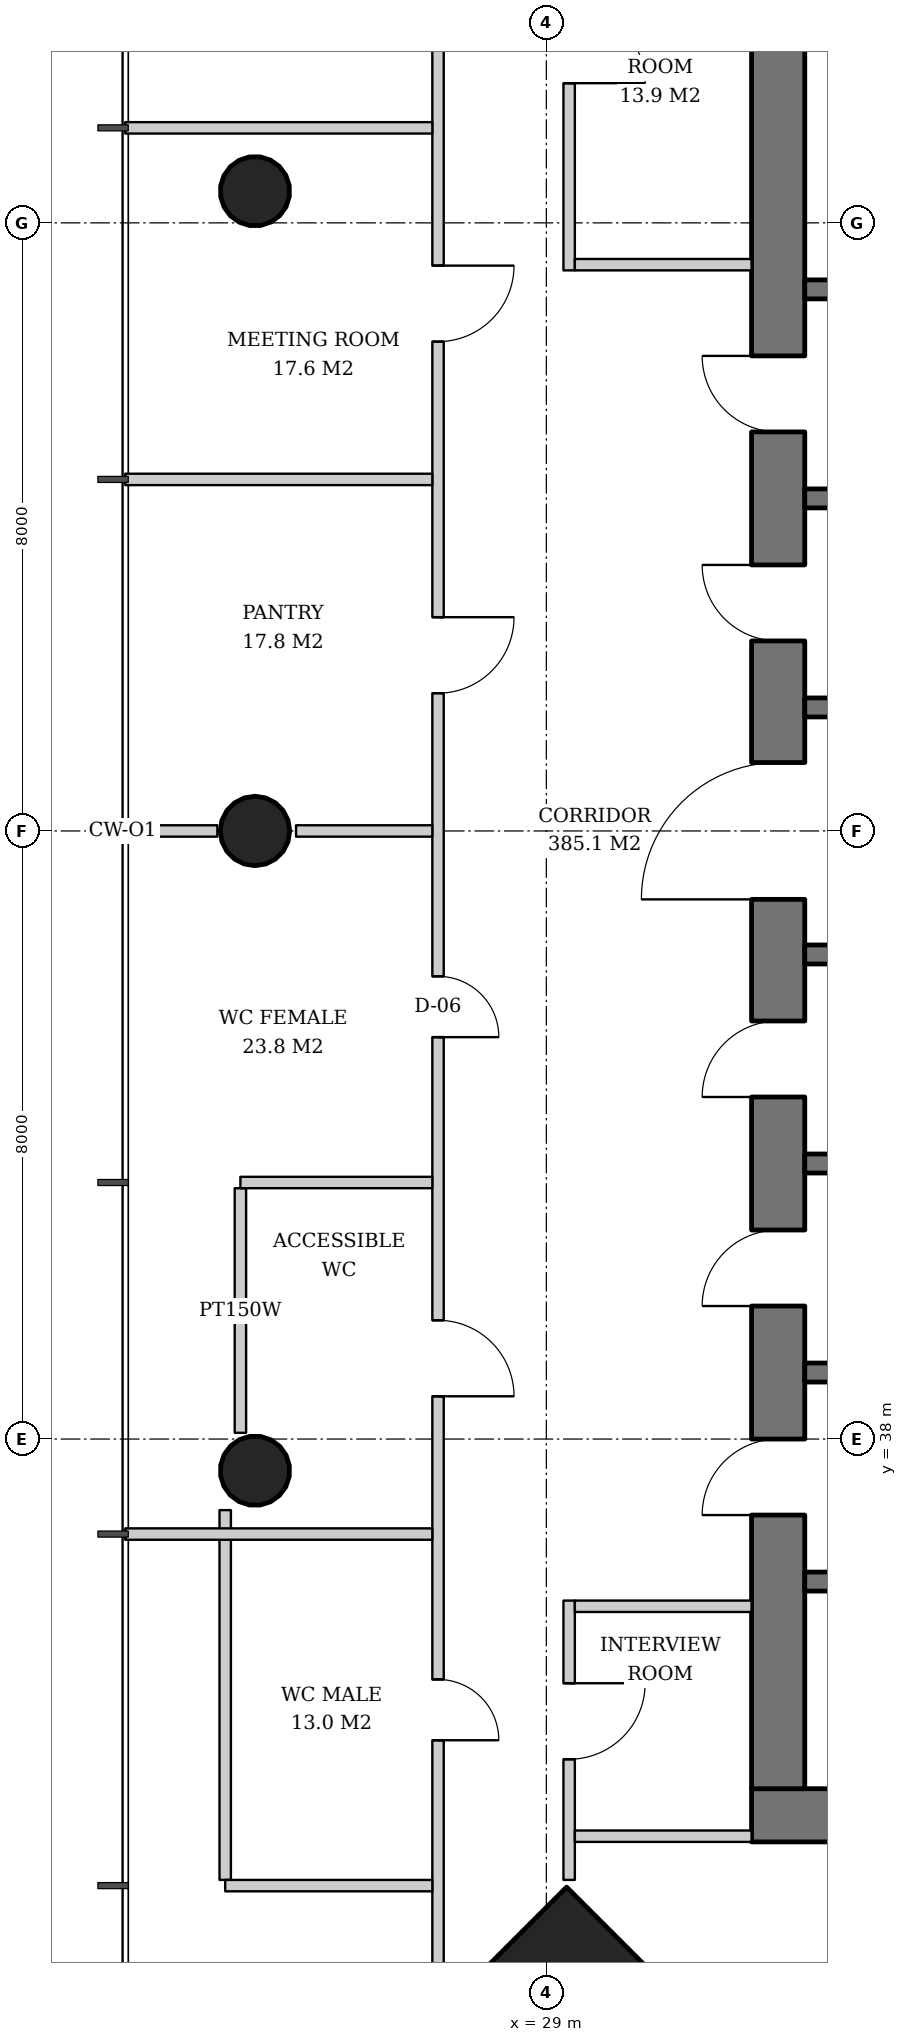
"""IFC4 building model, lengths in metres.
Left out: names, types, materials, properties, quantities, classifications, styles, units other than length and angle.
Written with IfcOpenShell. Run it as: python <this file> out.ifc"""

import sys

from ifc_helpers import new_model, si_unit, direction, frame, frame_2d, origin, origin_2d, place, context, subcontext, project, spatial, rectangle, hollow_circle, extrude, element, fill, save


model = new_model("IFC4")
c1 = context("Model", 3, precision=1e-05, world=origin(), true_north=direction((0.0, 1.0)))
c2 = subcontext(c1, "Body", "Model", "MODEL_VIEW")
j1 = project(units=[si_unit("LENGTHUNIT", "METRE"), si_unit("PLANEANGLEUNIT", "RADIAN")], contexts=[c1])
p1 = place(None, origin())
s1 = spatial("IfcSite", under=j1, at=p1, CompositionType="ELEMENT")
p2 = place(p1, origin())
s2 = spatial("IfcBuilding", under=s1, at=p2, CompositionType="ELEMENT")
p3 = place(p2, frame((0.0, 0.0, 150.2)))
s3 = spatial("IfcBuildingStorey", under=s2, at=p3, CompositionType="ELEMENT", Elevation=150.2)
p4 = place(p3, frame((29.229, 30.229, 0.0), z_axis=(0.031962158256, 0.031962158256, 0.998977898093), x_axis=(-0.707106781187, 0.707106781187, 0.0)))
e1 = element("IfcColumn", 1, at=p4, inside=s3, PredefinedType="COLUMN", context=c2, shape_type="SweptSolid", body=[
    extrude(rectangle(XDim=2.6, YDim=2.6, at=origin_2d()), origin(), (0.0, 0.0, 1.0), 3.804),
])
p5 = place(p3, frame((25.129, 54.436, 0.0), z_axis=(0.031910269556, -0.015987237665, 0.999362868496), x_axis=(0.447933021895, 0.894067115991, 0.0)))
e2 = element("IfcColumn", 2, at=p5, inside=s3, PredefinedType="COLUMN", context=c2, shape_type="SweptSolid", body=[
    extrude(hollow_circle(Radius=0.457, WallThickness=0.03, at=origin_2d()), origin(), (0.0, 0.0, 1.0), 3.802),
])
p6 = place(p3, frame((25.129, 46.0, 0.0), z_axis=(0.031914348339, 0.0, 0.999490607445), x_axis=(0.0, 1.0, 0.0)))
e3 = element("IfcColumn", 3, at=p6, inside=s3, PredefinedType="COLUMN", context=c2, shape_type="SweptSolid", body=[
    extrude(hollow_circle(Radius=0.457, WallThickness=0.03, at=origin_2d()), origin(), (0.0, 0.0, 1.0), 3.802),
])
p7 = place(p3, frame((25.129, 37.564, 0.0), z_axis=(0.031910269556, 0.015987237665, 0.999362868496), x_axis=(-0.447933021895, 0.894067115991, 0.0)))
e4 = element("IfcColumn", 4, at=p7, inside=s3, PredefinedType="COLUMN", context=c2, shape_type="SweptSolid", body=[
    extrude(hollow_circle(Radius=0.457, WallThickness=0.03, at=origin_2d()), origin(), (0.0, 0.0, 1.0), 3.802),
])
p8 = place(p3, frame((31.7, 33.05, 0.0), z_axis=(0.0, 0.0, 1.0), x_axis=(1.0, 0.0, 0.0)))
e5 = element("IfcWall", 5, at=p8, inside=s3, PredefinedType="SHEAR", context=c2, shape_type="SweptSolid", body=[
    extrude(rectangle(XDim=26.6, YDim=0.7, at=frame_2d((13.3, 0.0))), origin(), (0.0, 0.0, 1.0), 3.8),
])
p9 = place(p8, frame((7.3, 0.0, 0.0)))
e6 = element("IfcOpeningElement", 6, at=p9, cuts=e5, PredefinedType="OPENING", context=c2, shape_type="SweptSolid", body=[
    extrude(rectangle(XDim=1.0, YDim=2.1, at=frame_2d((0.5, 1.05))), frame((0.0, 0.36, 0.0), z_axis=(0.0, -1.0, 0.0), x_axis=(1.0, 0.0, 0.0)), (0.0, 0.0, 1.0), 0.72),
])
p10 = place(p8, frame((18.75, 0.0, 0.0)))
e7 = element("IfcOpeningElement", 7, at=p10, cuts=e5, PredefinedType="OPENING", context=c2, shape_type="SweptSolid", body=[
    extrude(rectangle(XDim=1.0, YDim=2.1, at=frame_2d((0.5, 1.05))), frame((0.0, 0.36, 0.0), z_axis=(0.0, -1.0, 0.0), x_axis=(1.0, 0.0, 0.0)), (0.0, 0.0, 1.0), 0.72),
])
p11 = place(p8, frame((1.85, 0.0, 0.0)))
e8 = element("IfcOpeningElement", 8, at=p11, cuts=e5, PredefinedType="OPENING", context=c2, shape_type="SweptSolid", body=[
    extrude(rectangle(XDim=1.0, YDim=2.1, at=frame_2d((0.5, 1.05))), frame((0.0, 0.36, 0.0), z_axis=(0.0, -1.0, 0.0), x_axis=(1.0, 0.0, 0.0)), (0.0, 0.0, 1.0), 0.72),
])
p12 = place(p8, frame((4.7, 0.0, 0.0)))
e9 = element("IfcOpeningElement", 9, at=p12, cuts=e5, PredefinedType="OPENING", context=c2, shape_type="SweptSolid", body=[
    extrude(rectangle(XDim=1.0, YDim=2.1, at=frame_2d((0.5, 1.05))), frame((0.0, 0.36, 0.0), z_axis=(0.0, -1.0, 0.0), x_axis=(1.0, 0.0, 0.0)), (0.0, 0.0, 1.0), 0.72),
])
p13 = place(p8, frame((12.44, 0.0, 0.0)))
e10 = element("IfcOpeningElement", 10, at=p13, cuts=e5, PredefinedType="OPENING", context=c2, shape_type="SweptSolid", body=[
    extrude(rectangle(XDim=1.0, YDim=2.1, at=frame_2d((0.5, 1.05))), frame((0.0, 0.36, 0.0), z_axis=(0.0, -1.0, 0.0), x_axis=(1.0, 0.0, 0.0)), (0.0, 0.0, 1.0), 0.72),
])
p14 = place(p8, frame((20.644, 0.0, 0.0)))
e11 = element("IfcOpeningElement", 11, at=p14, cuts=e5, PredefinedType="OPENING", context=c2, shape_type="SweptSolid", body=[
    extrude(rectangle(XDim=1.0, YDim=2.1, at=frame_2d((0.5, 1.05))), frame((0.0, 0.36, 0.0), z_axis=(0.0, -1.0, 0.0), x_axis=(1.0, 0.0, 0.0)), (0.0, 0.0, 1.0), 0.72),
])
p15 = place(p8, frame((23.544, 0.0, 0.0)))
e12 = element("IfcOpeningElement", 12, at=p15, cuts=e5, PredefinedType="OPENING", context=c2, shape_type="SweptSolid", body=[
    extrude(rectangle(XDim=1.0, YDim=2.1, at=frame_2d((0.5, 1.05))), frame((0.0, 0.36, 0.0), z_axis=(0.0, -1.0, 0.0), x_axis=(1.0, 0.0, 0.0)), (0.0, 0.0, 1.0), 0.72),
])
p16 = place(p3, frame((32.05, 33.4, 0.0), z_axis=(0.0, 0.0, 1.0), x_axis=(0.0, 1.0, 0.0)))
e13 = element("IfcWall", 13, at=p16, inside=s3, PredefinedType="SHEAR", context=c2, shape_type="SweptSolid", body=[
    extrude(rectangle(XDim=25.2, YDim=0.7, at=frame_2d((12.6, 0.0))), origin(), (0.0, 0.0, 1.0), 3.8),
])
p17 = place(p16, frame((11.7, 0.0, 0.0)))
e14 = element("IfcOpeningElement", 14, at=p17, cuts=e13, PredefinedType="OPENING", context=c2, shape_type="SweptSolid", body=[
    extrude(rectangle(XDim=1.8, YDim=2.4, at=frame_2d((0.9, 1.2))), frame((0.0, 0.36, 0.0), z_axis=(0.0, -1.0, 0.0), x_axis=(1.0, 0.0, 0.0)), (0.0, 0.0, 1.0), 0.72),
])
p18 = place(p16, frame((3.6, 0.0, 0.0)))
e15 = element("IfcOpeningElement", 15, at=p18, cuts=e13, PredefinedType="OPENING", context=c2, shape_type="SweptSolid", body=[
    extrude(rectangle(XDim=1.0, YDim=2.1, at=frame_2d((0.5, 1.05))), frame((0.0, 0.36, 0.0), z_axis=(0.0, -1.0, 0.0), x_axis=(1.0, 0.0, 0.0)), (0.0, 0.0, 1.0), 0.72),
])
p19 = place(p16, frame((6.35, 0.0, 0.0)))
e16 = element("IfcOpeningElement", 16, at=p19, cuts=e13, PredefinedType="OPENING", context=c2, shape_type="SweptSolid", body=[
    extrude(rectangle(XDim=1.0, YDim=2.1, at=frame_2d((0.5, 1.05))), frame((0.0, 0.36, 0.0), z_axis=(0.0, -1.0, 0.0), x_axis=(1.0, 0.0, 0.0)), (0.0, 0.0, 1.0), 0.72),
])
p20 = place(p16, frame((9.1, 0.0, 0.0)))
e17 = element("IfcOpeningElement", 17, at=p20, cuts=e13, PredefinedType="OPENING", context=c2, shape_type="SweptSolid", body=[
    extrude(rectangle(XDim=1.0, YDim=2.1, at=frame_2d((0.5, 1.05))), frame((0.0, 0.36, 0.0), z_axis=(0.0, -1.0, 0.0), x_axis=(1.0, 0.0, 0.0)), (0.0, 0.0, 1.0), 0.72),
])
p21 = place(p16, frame((15.1, 0.0, 0.0)))
e18 = element("IfcOpeningElement", 18, at=p21, cuts=e13, PredefinedType="OPENING", context=c2, shape_type="SweptSolid", body=[
    extrude(rectangle(XDim=1.0, YDim=2.1, at=frame_2d((0.5, 1.05))), frame((0.0, 0.36, 0.0), z_axis=(0.0, -1.0, 0.0), x_axis=(1.0, 0.0, 0.0)), (0.0, 0.0, 1.0), 0.72),
])
p22 = place(p16, frame((17.85, 0.0, 0.0)))
e19 = element("IfcOpeningElement", 19, at=p22, cuts=e13, PredefinedType="OPENING", context=c2, shape_type="SweptSolid", body=[
    extrude(rectangle(XDim=1.0, YDim=2.1, at=frame_2d((0.5, 1.05))), frame((0.0, 0.36, 0.0), z_axis=(0.0, -1.0, 0.0), x_axis=(1.0, 0.0, 0.0)), (0.0, 0.0, 1.0), 0.72),
])
for number, where, z_axis, x_axis in (
    (20, (32.4, 36.125, 0.0), (0.0, 0.0, 1.0), (1.0, 0.0, 0.0)),
    (21, (32.4, 38.875, 0.0), (0.0, 0.0, 1.0), (1.0, 0.0, 0.0)),
    (22, (32.4, 41.625, 0.0), (0.0, 0.0, 1.0), (1.0, 0.0, 0.0)),
    (23, (32.4, 44.375, 0.0), (0.0, 0.0, 1.0), (1.0, 0.0, 0.0)),
    (24, (32.4, 47.625, 0.0), (0.0, 0.0, 1.0), (1.0, 0.0, 0.0)),
    (25, (32.4, 50.375, 0.0), (0.0, 0.0, 1.0), (1.0, 0.0, 0.0)),
    (26, (32.4, 53.125, 0.0), (0.0, 0.0, 1.0), (1.0, 0.0, 0.0)),
):
    element("IfcWall", number, at=place(p3, frame(where, z_axis=z_axis, x_axis=x_axis)), inside=s3, PredefinedType="SHEAR", context=c2, shape_type="SweptSolid", body=[
        extrude(rectangle(XDim=2.7, YDim=0.25, at=frame_2d((1.35, 0.0))), origin(), (0.0, 0.0, 1.0), 3.8),
    ])
p23 = place(p3, frame((29.3, 59.8, 0.0), z_axis=(0.0, 0.0, 1.0), x_axis=(0.0, -1.0, 0.0)))
e27 = element("IfcWall", 27, at=p23, inside=s3, PredefinedType="PARTITIONING", context=c2, shape_type="SweptSolid", body=[
    extrude(rectangle(XDim=6.425, YDim=0.15, at=frame_2d((3.212, 0.0))), origin(), (0.0, 0.0, 1.0), 2.72),
])
p24 = place(p23, frame((2.962, 0.0, 0.0)))
e28 = element("IfcOpeningElement", 28, at=p24, cuts=e27, PredefinedType="OPENING", context=c2, shape_type="SweptSolid", body=[
    extrude(rectangle(XDim=1.0, YDim=2.1, at=frame_2d((0.5, 1.05))), frame((0.0, 0.085, 0.0), z_axis=(0.0, -1.0, 0.0), x_axis=(1.0, 0.0, 0.0)), (0.0, 0.0, 1.0), 0.17),
])
p25 = place(p3, frame((31.7, 53.45, 0.0), z_axis=(0.0, 0.0, 1.0), x_axis=(-1.0, 0.0, 0.0)))
e29 = element("IfcWall", 29, at=p25, inside=s3, PredefinedType="PARTITIONING", context=c2, shape_type="SweptSolid", body=[
    extrude(rectangle(XDim=2.325, YDim=0.15, at=frame_2d((1.163, 0.0))), origin(), (0.0, 0.0, 1.0), 3.62),
])
p26 = place(p3, frame((29.3, 35.875, 0.0), z_axis=(0.0, 0.0, 1.0), x_axis=(0.0, -1.0, 0.0)))
e30 = element("IfcWall", 30, at=p26, inside=s3, PredefinedType="PARTITIONING", context=c2, shape_type="SweptSolid", body=[
    extrude(rectangle(XDim=3.675, YDim=0.15, at=frame_2d((1.837, 0.0))), origin(), (0.0, 0.0, 1.0), 2.806),
])
p27 = place(p26, frame((1.087, 0.0, 0.0)))
e31 = element("IfcOpeningElement", 31, at=p27, cuts=e30, PredefinedType="OPENING", context=c2, shape_type="SweptSolid", body=[
    extrude(rectangle(XDim=1.0, YDim=2.1, at=frame_2d((0.5, 1.05))), frame((0.0, 0.085, 0.0), z_axis=(0.0, -1.0, 0.0), x_axis=(1.0, 0.0, 0.0)), (0.0, 0.0, 1.0), 0.17),
])
for number, where, z_axis, x_axis in (
    (32, (31.7, 35.8, 0.0), (0.0, 0.0, 1.0), (-1.0, 0.0, 0.0)),
    (33, (31.7, 32.775, 0.0), (0.0, 0.0, 1.0), (-1.0, 0.0, 0.0)),
):
    element("IfcWall", number, at=place(p3, frame(where, z_axis=z_axis, x_axis=x_axis)), inside=s3, PredefinedType="PARTITIONING", context=c2, shape_type="SweptSolid", body=[
        extrude(rectangle(XDim=2.325, YDim=0.15, at=frame_2d((1.163, 0.0))), origin(), (0.0, 0.0, 1.0), 3.62),
    ])
p28 = place(p3, frame((24.975, 41.3, 0.0), z_axis=(0.0, 0.0, 1.0), x_axis=(0.0, -1.0, 0.0)))
e34 = element("IfcWall", 34, at=p28, inside=s3, PredefinedType="PARTITIONING", context=c2, shape_type="SweptSolid", body=[
    extrude(rectangle(XDim=3.218, YDim=0.15, at=frame_2d((1.609, 0.0))), origin(), (0.0, 0.0, 1.0), 3.62),
])
p29 = place(p3, frame((24.775, 37.065, 0.0), z_axis=(0.0, 0.0, 1.0), x_axis=(0.0, -1.0, 0.0)))
e35 = element("IfcWall", 35, at=p29, inside=s3, PredefinedType="PARTITIONING", context=c2, shape_type="SweptSolid", body=[
    extrude(rectangle(XDim=4.865, YDim=0.15, at=frame_2d((2.433, 0.0))), origin(), (0.0, 0.0, 1.0), 3.62),
])
p30 = place(p3, frame((27.575, 61.511, 0.0), z_axis=(0.0, 0.0, 1.0), x_axis=(0.0, -1.0, 0.0)))
e36 = element("IfcWall", 36, at=p30, inside=s3, PredefinedType="PARTITIONING", context=c2, shape_type="SweptSolid", body=[
    extrude(rectangle(XDim=31.023, YDim=0.15, at=frame_2d((15.511, 0.0))), origin(), (0.0, 0.0, 1.0), 2.72),
])
p31 = place(p30, frame((3.449, 0.0, 0.0)))
e37 = element("IfcOpeningElement", 37, at=p31, cuts=e36, PredefinedType="OPENING", context=c2, shape_type="SweptSolid", body=[
    extrude(rectangle(XDim=1.0, YDim=2.1, at=frame_2d((0.5, 1.05))), frame((0.0, 0.085, 0.0), z_axis=(0.0, -1.0, 0.0), x_axis=(1.0, 0.0, 0.0)), (0.0, 0.0, 1.0), 0.17),
])
p32 = place(p30, frame((8.074, 0.0, 0.0)))
e38 = element("IfcOpeningElement", 38, at=p32, cuts=e36, PredefinedType="OPENING", context=c2, shape_type="SweptSolid", body=[
    extrude(rectangle(XDim=1.0, YDim=2.1, at=frame_2d((0.5, 1.05))), frame((0.0, 0.085, 0.0), z_axis=(0.0, -1.0, 0.0), x_axis=(1.0, 0.0, 0.0)), (0.0, 0.0, 1.0), 0.17),
])
p33 = place(p30, frame((12.699, 0.0, 0.0)))
e39 = element("IfcOpeningElement", 39, at=p33, cuts=e36, PredefinedType="OPENING", context=c2, shape_type="SweptSolid", body=[
    extrude(rectangle(XDim=1.0, YDim=2.1, at=frame_2d((0.5, 1.05))), frame((0.0, 0.085, 0.0), z_axis=(0.0, -1.0, 0.0), x_axis=(1.0, 0.0, 0.0)), (0.0, 0.0, 1.0), 0.17),
])
p34 = place(p30, frame((17.424, 0.0, 0.0)))
e40 = element("IfcOpeningElement", 40, at=p34, cuts=e36, PredefinedType="OPENING", context=c2, shape_type="SweptSolid", body=[
    extrude(rectangle(XDim=0.8, YDim=2.1, at=frame_2d((0.4, 1.05))), frame((0.0, 0.085, 0.0), z_axis=(0.0, -1.0, 0.0), x_axis=(1.0, 0.0, 0.0)), (0.0, 0.0, 1.0), 0.17),
])
p35 = place(p30, frame((21.949, 0.0, 0.0)))
e41 = element("IfcOpeningElement", 41, at=p35, cuts=e36, PredefinedType="OPENING", context=c2, shape_type="SweptSolid", body=[
    extrude(rectangle(XDim=1.0, YDim=2.1, at=frame_2d((0.5, 1.05))), frame((0.0, 0.085, 0.0), z_axis=(0.0, -1.0, 0.0), x_axis=(1.0, 0.0, 0.0)), (0.0, 0.0, 1.0), 0.17),
])
p36 = place(p30, frame((26.674, 0.0, 0.0)))
e42 = element("IfcOpeningElement", 42, at=p36, cuts=e36, PredefinedType="OPENING", context=c2, shape_type="SweptSolid", body=[
    extrude(rectangle(XDim=0.8, YDim=2.1, at=frame_2d((0.4, 1.05))), frame((0.0, 0.085, 0.0), z_axis=(0.0, -1.0, 0.0), x_axis=(1.0, 0.0, 0.0)), (0.0, 0.0, 1.0), 0.17),
])
for number, where, z_axis, x_axis in (
    (43, (27.5, 55.25, 0.0), (0.0, 0.0, 1.0), (-1.0, 0.0, 0.0)),
    (44, (27.5, 50.625, 0.0), (0.0, 0.0, 1.0), (-1.0, 0.0, 0.0)),
):
    element("IfcWall", number, at=place(p3, frame(where, z_axis=z_axis, x_axis=x_axis)), inside=s3, PredefinedType="PARTITIONING", context=c2, shape_type="SweptSolid", body=[
        extrude(rectangle(XDim=4.04, YDim=0.15, at=frame_2d((2.02, 0.0))), origin(), (0.0, 0.0, 1.0), 2.82),
    ])
p37 = place(p3, frame((27.5, 46.0, 0.0), z_axis=(0.0, 0.0, 1.0), x_axis=(-1.0, 0.0, 0.0)))
e45 = element("IfcWall", 45, at=p37, inside=s3, PredefinedType="PARTITIONING", context=c2, shape_type="SweptSolid", body=[
    extrude(rectangle(XDim=1.793, YDim=0.15, at=frame_2d((0.896, 0.0))), origin(), (0.0, 0.0, 1.0), 3.62),
])
p38 = place(p3, frame((24.672, 46.0, 0.0), z_axis=(0.0, 0.0, 1.0), x_axis=(-1.0, 0.0, 0.0)))
e46 = element("IfcWall", 46, at=p38, inside=s3, PredefinedType="PARTITIONING", context=c2, shape_type="SweptSolid", body=[
    extrude(rectangle(XDim=1.212, YDim=0.15, at=frame_2d((0.606, 0.0))), origin(), (0.0, 0.0, 1.0), 3.62),
])
p39 = place(p3, frame((27.5, 41.375, 0.0), z_axis=(0.0, 0.0, 1.0), x_axis=(-1.0, 0.0, 0.0)))
e47 = element("IfcWall", 47, at=p39, inside=s3, PredefinedType="PARTITIONING", context=c2, shape_type="SweptSolid", body=[
    extrude(rectangle(XDim=2.525, YDim=0.15, at=frame_2d((1.262, 0.0))), origin(), (0.0, 0.0, 1.0), 2.82),
])
p40 = place(p3, frame((27.5, 36.75, 0.0), z_axis=(0.0, 0.0, 1.0), x_axis=(-1.0, 0.0, 0.0)))
e48 = element("IfcWall", 48, at=p40, inside=s3, PredefinedType="PARTITIONING", context=c2, shape_type="SweptSolid", body=[
    extrude(rectangle(XDim=4.04, YDim=0.15, at=frame_2d((2.02, 0.0))), origin(), (0.0, 0.0, 1.0), 2.82),
])
p41 = place(p3, frame((27.5, 32.125, 0.0), z_axis=(0.0, 0.0, 1.0), x_axis=(-1.0, 0.0, 0.0)))
e49 = element("IfcWall", 49, at=p41, inside=s3, PredefinedType="PARTITIONING", context=c2, shape_type="SweptSolid", body=[
    extrude(rectangle(XDim=2.725, YDim=0.15, at=frame_2d((1.363, 0.0))), origin(), (0.0, 0.0, 1.0), 2.82),
])
p42 = place(p17, origin())
e50 = element("IfcDoor", 50, at=p42, inside=s3, OperationType="DOUBLE_DOOR_SINGLE_SWING", PredefinedType="DOOR", context=c2, shape_type="SweptSolid", body=[
    extrude(rectangle(XDim=1.8, YDim=2.4, at=frame_2d((0.9, 1.2))), frame((0.0, 0.025, 0.0), z_axis=(0.0, -1.0, 0.0), x_axis=(1.0, 0.0, 0.0)), (0.0, 0.0, 1.0), 0.05),
])
fill(e14, e50)
p43 = place(p18, origin())
e51 = element("IfcDoor", 51, at=p43, inside=s3, OperationType="SINGLE_SWING_LEFT", PredefinedType="DOOR", context=c2, shape_type="SweptSolid", body=[
    extrude(rectangle(XDim=1.0, YDim=2.1, at=frame_2d((0.5, 1.05))), frame((0.0, -0.29, 0.0), z_axis=(0.0, -1.0, 0.0), x_axis=(1.0, 0.0, 0.0)), (0.0, 0.0, 1.0), 0.05),
])
fill(e15, e51)
p44 = place(p19, origin())
e52 = element("IfcDoor", 52, at=p44, inside=s3, OperationType="SINGLE_SWING_LEFT", PredefinedType="DOOR", context=c2, shape_type="SweptSolid", body=[
    extrude(rectangle(XDim=1.0, YDim=2.1, at=frame_2d((0.5, 1.05))), frame((0.0, -0.29, 0.0), z_axis=(0.0, -1.0, 0.0), x_axis=(1.0, 0.0, 0.0)), (0.0, 0.0, 1.0), 0.05),
])
fill(e16, e52)
p45 = place(p20, origin())
e53 = element("IfcDoor", 53, at=p45, inside=s3, OperationType="SINGLE_SWING_LEFT", PredefinedType="DOOR", context=c2, shape_type="SweptSolid", body=[
    extrude(rectangle(XDim=1.0, YDim=2.1, at=frame_2d((0.5, 1.05))), frame((0.0, -0.29, 0.0), z_axis=(0.0, -1.0, 0.0), x_axis=(1.0, 0.0, 0.0)), (0.0, 0.0, 1.0), 0.05),
])
fill(e17, e53)
p46 = place(p21, origin())
e54 = element("IfcDoor", 54, at=p46, inside=s3, OperationType="SINGLE_SWING_RIGHT", PredefinedType="DOOR", context=c2, shape_type="SweptSolid", body=[
    extrude(rectangle(XDim=1.0, YDim=2.1, at=frame_2d((0.5, 1.05))), frame((0.0, -0.29, 0.0), z_axis=(0.0, -1.0, 0.0), x_axis=(1.0, 0.0, 0.0)), (0.0, 0.0, 1.0), 0.05),
])
fill(e18, e54)
p47 = place(p22, origin())
e55 = element("IfcDoor", 55, at=p47, inside=s3, OperationType="SINGLE_SWING_RIGHT", PredefinedType="DOOR", context=c2, shape_type="SweptSolid", body=[
    extrude(rectangle(XDim=1.0, YDim=2.1, at=frame_2d((0.5, 1.05))), frame((0.0, -0.29, 0.0), z_axis=(0.0, -1.0, 0.0), x_axis=(1.0, 0.0, 0.0)), (0.0, 0.0, 1.0), 0.05),
])
fill(e19, e55)
p48 = place(p24, origin())
e56 = element("IfcDoor", 56, at=p48, inside=s3, OperationType="SINGLE_SWING_RIGHT", PredefinedType="DOOR", context=c2, shape_type="SweptSolid", body=[
    extrude(rectangle(XDim=1.0, YDim=2.1, at=frame_2d((0.5, 1.05))), frame((0.0, 0.025, 0.0), z_axis=(0.0, -1.0, 0.0), x_axis=(1.0, 0.0, 0.0)), (0.0, 0.0, 1.0), 0.05),
])
fill(e28, e56)
p49 = place(p27, origin())
e57 = element("IfcDoor", 57, at=p49, inside=s3, OperationType="SINGLE_SWING_LEFT", PredefinedType="DOOR", context=c2, shape_type="SweptSolid", body=[
    extrude(rectangle(XDim=1.0, YDim=2.1, at=frame_2d((0.5, 1.05))), frame((0.0, 0.025, 0.0), z_axis=(0.0, -1.0, 0.0), x_axis=(1.0, 0.0, 0.0)), (0.0, 0.0, 1.0), 0.05),
])
fill(e31, e57)
p50 = place(p32, origin())
e58 = element("IfcDoor", 58, at=p50, inside=s3, OperationType="SINGLE_SWING_LEFT", PredefinedType="DOOR", context=c2, shape_type="SweptSolid", body=[
    extrude(rectangle(XDim=1.0, YDim=2.1, at=frame_2d((0.5, 1.05))), frame((0.0, 0.025, 0.0), z_axis=(0.0, -1.0, 0.0), x_axis=(1.0, 0.0, 0.0)), (0.0, 0.0, 1.0), 0.05),
])
fill(e38, e58)
p51 = place(p33, origin())
e59 = element("IfcDoor", 59, at=p51, inside=s3, OperationType="SINGLE_SWING_LEFT", PredefinedType="DOOR", context=c2, shape_type="SweptSolid", body=[
    extrude(rectangle(XDim=1.0, YDim=2.1, at=frame_2d((0.5, 1.05))), frame((0.0, 0.025, 0.0), z_axis=(0.0, -1.0, 0.0), x_axis=(1.0, 0.0, 0.0)), (0.0, 0.0, 1.0), 0.05),
])
fill(e39, e59)
p52 = place(p34, origin())
e60 = element("IfcDoor", 60, at=p52, inside=s3, OperationType="SINGLE_SWING_RIGHT", PredefinedType="DOOR", context=c2, shape_type="SweptSolid", body=[
    extrude(rectangle(XDim=0.8, YDim=2.1, at=frame_2d((0.4, 1.05))), frame((0.0, 0.025, 0.0), z_axis=(0.0, -1.0, 0.0), x_axis=(1.0, 0.0, 0.0)), (0.0, 0.0, 1.0), 0.05),
])
fill(e40, e60)
p53 = place(p35, origin())
e61 = element("IfcDoor", 61, at=p53, inside=s3, OperationType="SINGLE_SWING_RIGHT", PredefinedType="DOOR", context=c2, shape_type="SweptSolid", body=[
    extrude(rectangle(XDim=1.0, YDim=2.1, at=frame_2d((0.5, 1.05))), frame((0.0, 0.025, 0.0), z_axis=(0.0, -1.0, 0.0), x_axis=(1.0, 0.0, 0.0)), (0.0, 0.0, 1.0), 0.05),
])
fill(e41, e61)
p54 = place(p36, origin())
e62 = element("IfcDoor", 62, at=p54, inside=s3, OperationType="SINGLE_SWING_RIGHT", PredefinedType="DOOR", context=c2, shape_type="SweptSolid", body=[
    extrude(rectangle(XDim=0.8, YDim=2.1, at=frame_2d((0.4, 1.05))), frame((0.0, 0.025, 0.0), z_axis=(0.0, -1.0, 0.0), x_axis=(1.0, 0.0, 0.0)), (0.0, 0.0, 1.0), 0.05),
])
fill(e42, e62)
save(model, sys.argv[1])
